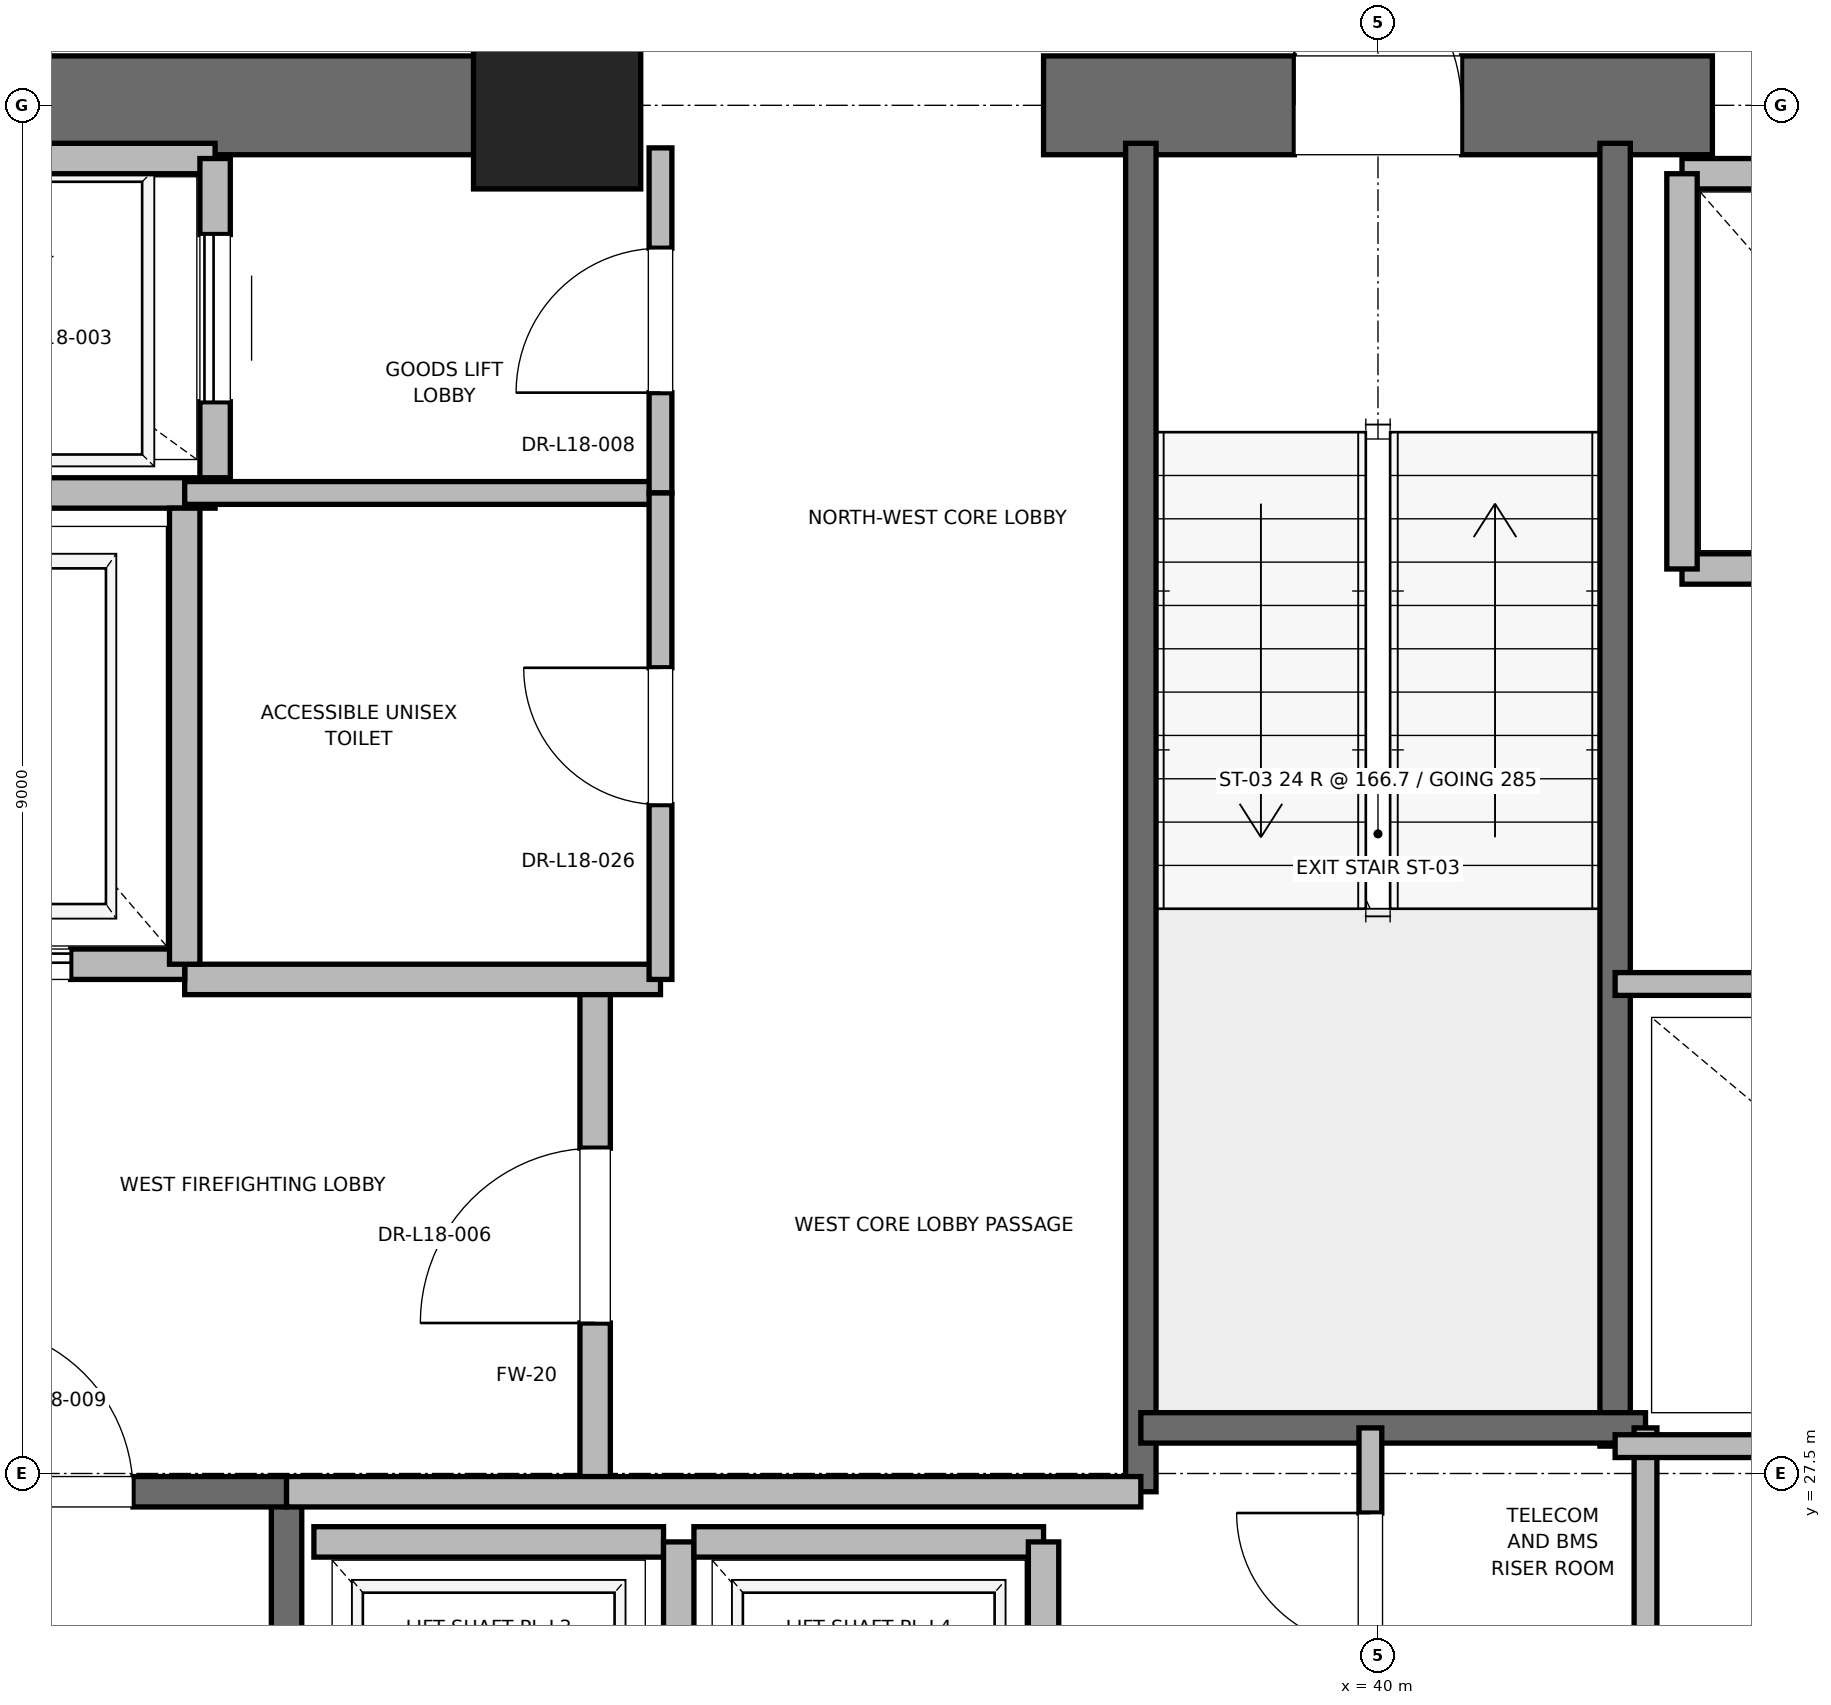
"""IFC4 building model, lengths in metres.
Left out: names, types, materials, properties, quantities, classifications, styles, units other than length and angle.
Written with IfcOpenShell. Run it as: python <this file> out.ifc"""

import sys

from ifc_helpers import new_model, si_unit, direction, frame, frame_2d, origin, origin_2d, place, context, subcontext, project, spatial, rectangle, extrude, element, fill, save


model = new_model("IFC4")
c1 = context("Model", 3, precision=1e-05, world=origin(), true_north=direction((0.0, 1.0)))
c2 = subcontext(c1, "Body", "Model", "MODEL_VIEW")
j1 = project(units=[si_unit("LENGTHUNIT", "METRE"), si_unit("PLANEANGLEUNIT", "RADIAN")], contexts=[c1])
p1 = place(None, origin())
s1 = spatial("IfcSite", under=j1, at=p1, CompositionType="ELEMENT")
p2 = place(p1, origin())
s2 = spatial("IfcBuilding", under=s1, at=p2, CompositionType="ELEMENT")
p3 = place(p2, frame((0.0, 0.0, 79.6)))
s3 = spatial("IfcBuildingStorey", under=s2, at=p3, CompositionType="ELEMENT", Elevation=79.6)
p4 = place(p3, frame((34.6, 36.5, 0.0), z_axis=(0.0, 0.0, 1.0), x_axis=(1.0, 0.0, 0.0)))
e1 = element("IfcColumn", 1, at=p4, inside=s3, PredefinedType="PILASTER", context=c2, shape_type="SweptSolid", body=[
    extrude(rectangle(XDim=1.1, YDim=1.1, at=origin_2d()), origin(), (0.0, 0.0, 1.0), 4.0),
])
p5 = place(p3, frame((29.0, 36.5, 0.0), z_axis=(0.0, 0.0, 1.0), x_axis=(1.0, 0.0, 0.0)))
e2 = element("IfcWall", 2, at=p5, inside=s3, PredefinedType="SHEAR", context=c2, shape_type="SweptSolid", body=[
    extrude(rectangle(XDim=5.8, YDim=0.65, at=frame_2d((2.9, 0.0))), origin(), (0.0, 0.0, 1.0), 3.76),
])
p6 = place(p3, frame((37.8, 36.5, 0.0), z_axis=(0.0, 0.0, 1.0), x_axis=(1.0, 0.0, 0.0)))
e3 = element("IfcWall", 3, at=p6, inside=s3, PredefinedType="SHEAR", context=c2, shape_type="SweptSolid", body=[
    extrude(rectangle(XDim=4.4, YDim=0.65, at=frame_2d((2.2, 0.0))), origin(), (0.0, 0.0, 1.0), 3.76),
])
p7 = place(p6, frame((1.65, 0.0, 0.0)))
e4 = element("IfcOpeningElement", 4, at=p7, cuts=e3, PredefinedType="OPENING", context=c2, shape_type="SweptSolid", body=[
    extrude(rectangle(XDim=1.1, YDim=2.15, at=frame_2d((0.55, 1.075))), frame((0.0, 0.325, 0.0), z_axis=(0.0, -1.0, 0.0), x_axis=(1.0, 0.0, 0.0)), (0.0, 0.0, 1.0), 0.65),
])
p8 = place(p3, frame((32.82, 18.6, 0.0), z_axis=(0.0, 0.0, 1.0), x_axis=(0.0, 1.0, 0.0)))
e5 = element("IfcWall", 5, at=p8, inside=s3, PredefinedType="SOLIDWALL", context=c2, shape_type="SweptSolid", body=[
    extrude(rectangle(XDim=8.78, YDim=0.2, at=frame_2d((4.39, 0.0))), origin(), (0.0, 0.0, 1.0), 3.76),
])
p9 = place(p3, frame((29.7, 27.38, 0.0), z_axis=(0.0, 0.0, 1.0), x_axis=(1.0, 0.0, 0.0)))
e6 = element("IfcWall", 6, at=p9, inside=s3, PredefinedType="SOLIDWALL", context=c2, shape_type="SweptSolid", body=[
    extrude(rectangle(XDim=3.12, YDim=0.2, at=frame_2d((1.56, 0.0))), origin(), (0.0, 0.0, 1.0), 3.76),
])
p10 = place(p9, frame((1.01, 0.0, 0.0)))
e7 = element("IfcOpeningElement", 7, at=p10, cuts=e6, PredefinedType="OPENING", context=c2, shape_type="SweptSolid", body=[
    extrude(rectangle(XDim=1.1, YDim=2.15, at=frame_2d((0.55, 1.075))), frame((0.0, 0.1, 0.0), z_axis=(0.0, -1.0, 0.0), x_axis=(1.0, 0.0, 0.0)), (0.0, 0.0, 1.0), 0.2),
])
p11 = place(p3, frame((38.44, 27.38, 0.0), z_axis=(0.0, 0.0, 1.0), x_axis=(0.0, 1.0, 0.0)))
e8 = element("IfcWall", 8, at=p11, inside=s3, PredefinedType="SOLIDWALL", context=c2, shape_type="SweptSolid", body=[
    extrude(rectangle(XDim=8.87, YDim=0.2, at=frame_2d((4.435, 0.0))), origin(), (0.0, 0.0, 1.0), 3.76),
])
p12 = place(p3, frame((41.56, 27.68, 0.0), z_axis=(0.0, 0.0, 1.0), x_axis=(0.0, 1.0, 0.0)))
e9 = element("IfcWall", 9, at=p12, inside=s3, PredefinedType="SOLIDWALL", context=c2, shape_type="SweptSolid", body=[
    extrude(rectangle(XDim=8.57, YDim=0.2, at=frame_2d((4.285, 0.0))), origin(), (0.0, 0.0, 1.0), 3.76),
])
p13 = place(p3, frame((38.44, 27.8, 0.0), z_axis=(0.0, 0.0, 1.0), x_axis=(1.0, 0.0, 0.0)))
e10 = element("IfcWall", 10, at=p13, inside=s3, PredefinedType="SOLIDWALL", context=c2, shape_type="SweptSolid", body=[
    extrude(rectangle(XDim=3.32, YDim=0.2, at=frame_2d((1.66, 0.0))), origin(), (0.0, 0.0, 1.0), 3.76),
])
p14 = place(p3, frame((34.85, 27.38, 0.0), z_axis=(0.0, 0.0, 1.0), x_axis=(0.0, 1.0, 0.0)))
e11 = element("IfcWall", 11, at=p14, inside=s3, PredefinedType="PARTITIONING", context=c2, shape_type="SweptSolid", body=[
    extrude(rectangle(XDim=3.37, YDim=0.2, at=frame_2d((1.685, 0.0))), origin(), (0.0, 0.0, 1.0), 3.76),
])
p15 = place(p14, frame((1.11, 0.0, 0.0)))
e12 = element("IfcOpeningElement", 12, at=p15, cuts=e11, PredefinedType="OPENING", context=c2, shape_type="SweptSolid", body=[
    extrude(rectangle(XDim=1.15, YDim=2.2, at=frame_2d((0.575, 1.1))), frame((0.0, 0.1, 0.0), z_axis=(0.0, -1.0, 0.0), x_axis=(1.0, 0.0, 0.0)), (0.0, 0.0, 1.0), 0.2),
])
p16 = place(p3, frame((32.82, 27.38, 0.0), z_axis=(0.0, 0.0, 1.0), x_axis=(1.0, 0.0, 0.0)))
e13 = element("IfcWall", 13, at=p16, inside=s3, PredefinedType="PARTITIONING", context=c2, shape_type="SweptSolid", body=[
    extrude(rectangle(XDim=5.62, YDim=0.2, at=frame_2d((2.81, 0.0))), origin(), (0.0, 0.0, 1.0), 3.76),
])
p17 = place(p3, frame((32.15, 30.75, 0.0), z_axis=(0.0, 0.0, 1.0), x_axis=(1.0, 0.0, 0.0)))
e14 = element("IfcWall", 14, at=p17, inside=s3, PredefinedType="PARTITIONING", context=c2, shape_type="SweptSolid", body=[
    extrude(rectangle(XDim=3.13, YDim=0.2, at=frame_2d((1.565, 0.0))), origin(), (0.0, 0.0, 1.0), 3.76),
])
p18 = place(p3, frame((29.55, 30.85, 0.0), z_axis=(0.0, 0.0, 1.0), x_axis=(1.0, 0.0, 0.0)))
e15 = element("IfcWall", 15, at=p18, inside=s3, PredefinedType="SOLIDWALL", context=c2, shape_type="SweptSolid", body=[
    extrude(rectangle(XDim=2.6, YDim=0.2, at=frame_2d((1.3, 0.0))), origin(), (0.0, 0.0, 1.0), 2.54),
])
p19 = place(p18, frame((0.75, 0.0, 0.0)))
e16 = element("IfcOpeningElement", 16, at=p19, cuts=e15, PredefinedType="OPENING", context=c2, shape_type="SweptSolid", body=[
    extrude(rectangle(XDim=1.1, YDim=2.2, at=frame_2d((0.55, 1.1))), frame((0.0, 0.1, 0.0), z_axis=(0.0, -1.0, 0.0), x_axis=(1.0, 0.0, 0.0)), (0.0, 0.0, 1.0), 0.2),
])
p20 = place(p3, frame((29.55, 33.95, 0.0), z_axis=(0.0, 0.0, 1.0), x_axis=(1.0, 0.0, 0.0)))
e17 = element("IfcWall", 17, at=p20, inside=s3, PredefinedType="SOLIDWALL", context=c2, shape_type="SweptSolid", body=[
    extrude(rectangle(XDim=2.8, YDim=0.2, at=frame_2d((1.4, 0.0))), origin(), (0.0, 0.0, 1.0), 3.76),
])
p21 = place(p3, frame((32.15, 30.85, 0.0), z_axis=(0.0, 0.0, 1.0), x_axis=(0.0, 1.0, 0.0)))
e18 = element("IfcWall", 18, at=p21, inside=s3, PredefinedType="SOLIDWALL", context=c2, shape_type="SweptSolid", body=[
    extrude(rectangle(XDim=3.0, YDim=0.2, at=frame_2d((1.5, 0.0))), origin(), (0.0, 0.0, 1.0), 3.76),
])
p22 = place(p3, frame((32.35, 36.15, 0.0), z_axis=(0.0, 0.0, 1.0), x_axis=(-1.0, 0.0, 0.0)))
e19 = element("IfcWall", 19, at=p22, inside=s3, PredefinedType="SOLIDWALL", context=c2, shape_type="SweptSolid", body=[
    extrude(rectangle(XDim=2.8, YDim=0.2, at=frame_2d((1.4, 0.0))), origin(), (0.0, 0.0, 1.0), 2.889),
])
p23 = place(p3, frame((32.35, 34.05, 0.0), z_axis=(0.0, 0.0, 1.0), x_axis=(0.0, 1.0, 0.0)))
e20 = element("IfcWall", 20, at=p23, inside=s3, PredefinedType="SOLIDWALL", context=c2, shape_type="SweptSolid", body=[
    extrude(rectangle(XDim=2.1, YDim=0.2, at=frame_2d((1.05, 0.0))), origin(), (0.0, 0.0, 1.0), 3.76),
])
p24 = place(p23, frame((0.5, 0.0, 0.0)))
e21 = element("IfcOpeningElement", 21, at=p24, cuts=e20, PredefinedType="OPENING", context=c2, shape_type="SweptSolid", body=[
    extrude(rectangle(XDim=1.1, YDim=2.2, at=frame_2d((0.55, 1.1))), frame((0.0, 0.1, 0.0), z_axis=(0.0, -1.0, 0.0), x_axis=(1.0, 0.0, 0.0)), (0.0, 0.0, 1.0), 0.2),
])
p25 = place(p3, frame((35.3, 27.05, 0.0), z_axis=(0.0, 0.0, 1.0), x_axis=(-1.0, 0.0, 0.0)))
e22 = element("IfcWall", 22, at=p25, inside=s3, PredefinedType="SOLIDWALL", context=c2, shape_type="SweptSolid", body=[
    extrude(rectangle(XDim=2.3, YDim=0.2, at=frame_2d((1.15, 0.0))), origin(), (0.0, 0.0, 1.0), 3.76),
])
p26 = place(p3, frame((35.4, 24.45, 0.0), z_axis=(0.0, 0.0, 1.0), x_axis=(0.0, 1.0, 0.0)))
e23 = element("IfcWall", 23, at=p26, inside=s3, PredefinedType="SOLIDWALL", context=c2, shape_type="SweptSolid", body=[
    extrude(rectangle(XDim=2.6, YDim=0.2, at=frame_2d((1.3, 0.0))), origin(), (0.0, 0.0, 1.0), 3.76),
])
p27 = place(p3, frame((37.8, 27.05, 0.0), z_axis=(0.0, 0.0, 1.0), x_axis=(-1.0, 0.0, 0.0)))
e24 = element("IfcWall", 24, at=p27, inside=s3, PredefinedType="SOLIDWALL", context=c2, shape_type="SweptSolid", body=[
    extrude(rectangle(XDim=2.3, YDim=0.2, at=frame_2d((1.15, 0.0))), origin(), (0.0, 0.0, 1.0), 3.76),
])
p28 = place(p3, frame((37.8, 24.45, 0.0), z_axis=(0.0, 0.0, 1.0), x_axis=(0.0, 1.0, 0.0)))
e25 = element("IfcWall", 25, at=p28, inside=s3, PredefinedType="SOLIDWALL", context=c2, shape_type="SweptSolid", body=[
    extrude(rectangle(XDim=2.6, YDim=0.2, at=frame_2d((1.3, 0.0))), origin(), (0.0, 0.0, 1.0), 3.76),
])
p29 = place(p3, frame((42.0, 33.45, 0.0), z_axis=(0.0, 0.0, 1.0), x_axis=(1.0, 0.0, 0.0)))
e26 = element("IfcWall", 26, at=p29, inside=s3, PredefinedType="SOLIDWALL", context=c2, shape_type="SweptSolid", body=[
    extrude(rectangle(XDim=2.3, YDim=0.2, at=frame_2d((1.15, 0.0))), origin(), (0.0, 0.0, 1.0), 3.76),
])
p30 = place(p3, frame((44.3, 36.05, 0.0), z_axis=(0.0, 0.0, 1.0), x_axis=(-1.0, 0.0, 0.0)))
e27 = element("IfcWall", 27, at=p30, inside=s3, PredefinedType="SOLIDWALL", context=c2, shape_type="SweptSolid", body=[
    extrude(rectangle(XDim=2.3, YDim=0.2, at=frame_2d((1.15, 0.0))), origin(), (0.0, 0.0, 1.0), 2.54),
])
p31 = place(p3, frame((42.0, 36.05, 0.0), z_axis=(0.0, 0.0, 1.0), x_axis=(0.0, -1.0, 0.0)))
e28 = element("IfcWall", 28, at=p31, inside=s3, PredefinedType="SOLIDWALL", context=c2, shape_type="SweptSolid", body=[
    extrude(rectangle(XDim=2.6, YDim=0.2, at=frame_2d((1.3, 0.0))), origin(), (0.0, 0.0, 1.0), 2.54),
])
p32 = place(p3, frame((41.76, 23.8, 0.0), z_axis=(0.0, 0.0, 1.0), x_axis=(0.0, 1.0, 0.0)))
e29 = element("IfcWall", 29, at=p32, inside=s3, PredefinedType="PARTITIONING", context=c2, shape_type="SweptSolid", body=[
    extrude(rectangle(XDim=4.0, YDim=0.15, at=frame_2d((2.0, 0.0))), origin(), (0.0, 0.0, 1.0), 2.85),
])
p33 = place(p3, frame((39.95, 25.8, 0.0), z_axis=(0.0, 0.0, 1.0), x_axis=(0.0, 1.0, 0.0)))
e30 = element("IfcWall", 30, at=p33, inside=s3, PredefinedType="PARTITIONING", context=c2, shape_type="SweptSolid", body=[
    extrude(rectangle(XDim=2.0, YDim=0.15, at=frame_2d((1.0, 0.0))), origin(), (0.0, 0.0, 1.0), 2.85),
])
p34 = place(p33, frame((0.56, 0.0, 0.0)))
e31 = element("IfcOpeningElement", 31, at=p34, cuts=e30, PredefinedType="OPENING", context=c2, shape_type="SweptSolid", body=[
    extrude(rectangle(XDim=0.88, YDim=2.1, at=frame_2d((0.44, 1.05))), frame((0.0, 0.075, 0.0), z_axis=(0.0, -1.0, 0.0), x_axis=(1.0, 0.0, 0.0)), (0.0, 0.0, 1.0), 0.15),
])
p35 = place(p3, frame((32.15, 33.95, 0.0), z_axis=(0.0, 0.0, 1.0), x_axis=(1.0, 0.0, 0.0)))
e32 = element("IfcWall", 32, at=p35, inside=s3, PredefinedType="PARTITIONING", context=c2, shape_type="SweptSolid", body=[
    extrude(rectangle(XDim=3.13, YDim=0.15, at=frame_2d((1.565, 0.0))), origin(), (0.0, 0.0, 1.0), 2.85),
])
p36 = place(p3, frame((35.28, 33.95, 0.0), z_axis=(0.0, 0.0, 1.0), x_axis=(0.0, 1.0, 0.0)))
e33 = element("IfcWall", 33, at=p36, inside=s3, PredefinedType="PARTITIONING", context=c2, shape_type="SweptSolid", body=[
    extrude(rectangle(XDim=2.27, YDim=0.15, at=frame_2d((1.135, 0.0))), origin(), (0.0, 0.0, 1.0), 2.54),
])
p37 = place(p36, frame((0.66, 0.0, 0.0)))
e34 = element("IfcOpeningElement", 34, at=p37, cuts=e33, PredefinedType="OPENING", context=c2, shape_type="SweptSolid", body=[
    extrude(rectangle(XDim=0.95, YDim=2.15, at=frame_2d((0.475, 1.075))), frame((0.0, 0.075, 0.0), z_axis=(0.0, -1.0, 0.0), x_axis=(1.0, 0.0, 0.0)), (0.0, 0.0, 1.0), 0.15),
])
p38 = place(p3, frame((35.28, 30.75, 0.0), z_axis=(0.0, 0.0, 1.0), x_axis=(0.0, 1.0, 0.0)))
e35 = element("IfcWall", 35, at=p38, inside=s3, PredefinedType="PARTITIONING", context=c2, shape_type="SweptSolid", body=[
    extrude(rectangle(XDim=3.2, YDim=0.15, at=frame_2d((1.6, 0.0))), origin(), (0.0, 0.0, 1.0), 2.85),
])
p39 = place(p38, frame((1.15, 0.0, 0.0)))
e36 = element("IfcOpeningElement", 36, at=p39, cuts=e35, PredefinedType="OPENING", context=c2, shape_type="SweptSolid", body=[
    extrude(rectangle(XDim=0.9, YDim=2.1, at=frame_2d((0.45, 1.05))), frame((0.0, 0.075, 0.0), z_axis=(0.0, -1.0, 0.0), x_axis=(1.0, 0.0, 0.0)), (0.0, 0.0, 1.0), 0.15),
])
p40 = place(p3, frame((41.56, 27.68, 0.0), z_axis=(0.0, 0.0, 1.0), x_axis=(1.0, 0.0, 0.0)))
e37 = element("IfcWall", 37, at=p40, inside=s3, PredefinedType="PARTITIONING", context=c2, shape_type="SweptSolid", body=[
    extrude(rectangle(XDim=3.59, YDim=0.15, at=frame_2d((1.795, 0.0))), origin(), (0.0, 0.0, 1.0), 2.85),
])
p41 = place(p3, frame((41.56, 30.72, 0.0), z_axis=(0.0, 0.0, 1.0), x_axis=(1.0, 0.0, 0.0)))
e38 = element("IfcWall", 38, at=p41, inside=s3, PredefinedType="PARTITIONING", context=c2, shape_type="SweptSolid", body=[
    extrude(rectangle(XDim=3.59, YDim=0.15, at=frame_2d((1.795, 0.0))), origin(), (0.0, 0.0, 1.0), 2.85),
])
p42 = place(p41, frame((1.355, 0.0, 0.0)))
e39 = element("IfcOpeningElement", 39, at=p42, cuts=e38, PredefinedType="OPENING", context=c2, shape_type="SweptSolid", body=[
    extrude(rectangle(XDim=0.88, YDim=2.1, at=frame_2d((0.44, 1.05))), frame((0.0, 0.075, 0.0), z_axis=(0.0, -1.0, 0.0), x_axis=(1.0, 0.0, 0.0)), (0.0, 0.0, 1.0), 0.15),
])
p43 = place(p10, origin())
e40 = element("IfcDoor", 40, at=p43, inside=s3, OperationType="SINGLE_SWING_LEFT", PredefinedType="DOOR", context=c2, shape_type="SweptSolid", body=[
    extrude(rectangle(XDim=1.1, YDim=2.15, at=frame_2d((0.55, 1.075))), frame((0.0, 0.025, 0.0), z_axis=(0.0, -1.0, 0.0), x_axis=(1.0, 0.0, 0.0)), (0.0, 0.0, 1.0), 0.05),
])
fill(e7, e40)
p44 = place(p7, origin())
e41 = element("IfcDoor", 41, at=p44, inside=s3, OperationType="SINGLE_SWING_LEFT", PredefinedType="DOOR", context=c2, shape_type="SweptSolid", body=[
    extrude(rectangle(XDim=1.1, YDim=2.15, at=frame_2d((0.55, 1.075))), frame((0.0, 0.025, 0.0), z_axis=(0.0, -1.0, 0.0), x_axis=(1.0, 0.0, 0.0)), (0.0, 0.0, 1.0), 0.05),
])
fill(e4, e41)
p45 = place(p15, origin())
e42 = element("IfcDoor", 42, at=p45, inside=s3, OperationType="SINGLE_SWING_LEFT", PredefinedType="DOOR", context=c2, shape_type="SweptSolid", body=[
    extrude(rectangle(XDim=1.15, YDim=2.2, at=frame_2d((0.575, 1.1))), frame((0.0, 0.025, 0.0), z_axis=(0.0, -1.0, 0.0), x_axis=(1.0, 0.0, 0.0)), (0.0, 0.0, 1.0), 0.05),
])
fill(e12, e42)
p46 = place(p19, origin())
e43 = element("IfcDoor", 43, at=p46, inside=s3, OperationType="SLIDING_TO_RIGHT", PredefinedType="DOOR", context=c2, shape_type="SweptSolid", body=[
    extrude(rectangle(XDim=1.1, YDim=2.2, at=frame_2d((0.55, 1.1))), frame((0.0, 0.025, 0.0), z_axis=(0.0, -1.0, 0.0), x_axis=(1.0, 0.0, 0.0)), (0.0, 0.0, 1.0), 0.05),
])
fill(e16, e43)
p47 = place(p24, origin())
e44 = element("IfcDoor", 44, at=p47, inside=s3, OperationType="SLIDING_TO_RIGHT", PredefinedType="DOOR", context=c2, shape_type="SweptSolid", body=[
    extrude(rectangle(XDim=1.1, YDim=2.2, at=frame_2d((0.55, 1.1))), frame((0.0, 0.025, 0.0), z_axis=(0.0, -1.0, 0.0), x_axis=(1.0, 0.0, 0.0)), (0.0, 0.0, 1.0), 0.05),
])
fill(e21, e44)
p48 = place(p34, origin())
e45 = element("IfcDoor", 45, at=p48, inside=s3, OperationType="SINGLE_SWING_RIGHT", PredefinedType="DOOR", context=c2, shape_type="SweptSolid", body=[
    extrude(rectangle(XDim=0.88, YDim=2.1, at=frame_2d((0.44, 1.05))), frame((0.0, 0.025, 0.0), z_axis=(0.0, -1.0, 0.0), x_axis=(1.0, 0.0, 0.0)), (0.0, 0.0, 1.0), 0.05),
])
fill(e31, e45)
p49 = place(p37, origin())
e46 = element("IfcDoor", 46, at=p49, inside=s3, OperationType="SINGLE_SWING_LEFT", PredefinedType="DOOR", context=c2, shape_type="SweptSolid", body=[
    extrude(rectangle(XDim=0.95, YDim=2.15, at=frame_2d((0.475, 1.075))), frame((0.0, 0.025, 0.0), z_axis=(0.0, -1.0, 0.0), x_axis=(1.0, 0.0, 0.0)), (0.0, 0.0, 1.0), 0.05),
])
fill(e34, e46)
p50 = place(p39, origin())
e47 = element("IfcDoor", 47, at=p50, inside=s3, OperationType="SINGLE_SWING_RIGHT", PredefinedType="DOOR", context=c2, shape_type="SweptSolid", body=[
    extrude(rectangle(XDim=0.9, YDim=2.1, at=frame_2d((0.45, 1.05))), frame((0.0, 0.025, 0.0), z_axis=(0.0, -1.0, 0.0), x_axis=(1.0, 0.0, 0.0)), (0.0, 0.0, 1.0), 0.05),
])
fill(e36, e47)
save(model, sys.argv[1])
